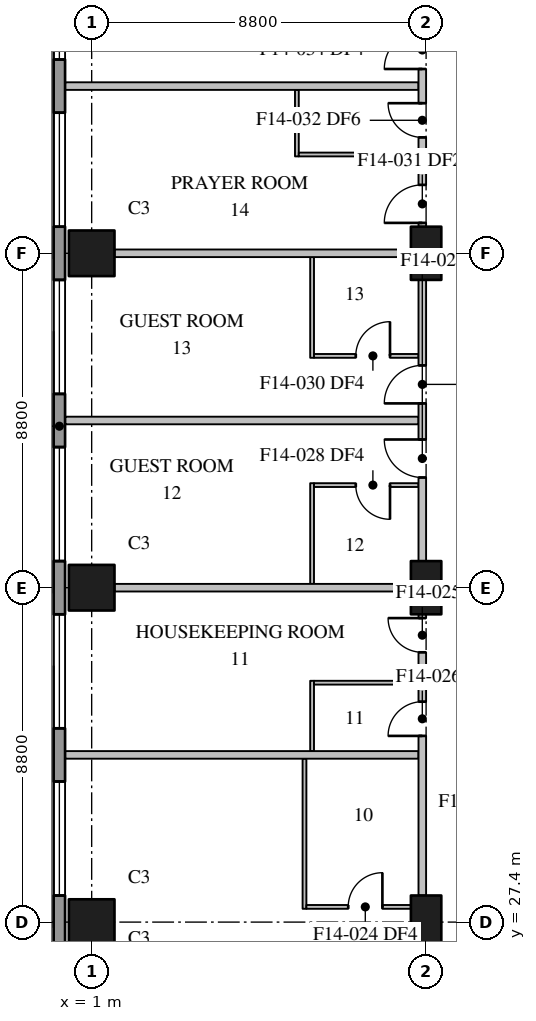
"""IFC4 building model, lengths in metres.
Left out: names, types, materials, properties, quantities, classifications, styles, units other than length and angle.
Written with IfcOpenShell. Run it as: python <this file> out.ifc"""

import sys

from ifc_helpers import new_model, si_unit, direction, frame, frame_2d, origin, origin_2d, place, context, subcontext, project, spatial, rectangle, extrude, element, fill, save


model = new_model("IFC4")
c1 = context("Model", 3, precision=1e-05, world=origin(), true_north=direction((0.0, 1.0)))
c2 = subcontext(c1, "Body", "Model", "MODEL_VIEW")
j1 = project(units=[si_unit("LENGTHUNIT", "METRE"), si_unit("PLANEANGLEUNIT", "RADIAN")], contexts=[c1])
p1 = place(None, origin())
s1 = spatial("IfcSite", under=j1, at=p1, CompositionType="ELEMENT")
p2 = place(p1, origin())
s2 = spatial("IfcBuilding", under=s1, at=p2, CompositionType="ELEMENT")
p3 = place(p2, frame((0.0, 0.0, 129.6)))
s3 = spatial("IfcBuildingStorey", under=s2, at=p3, CompositionType="ELEMENT", Elevation=129.6)
for number, where, z_axis, x_axis in (
    (1, (1.0, 27.4, 0.0), (0.0, 0.0, 1.0), (1.0, 0.0, 0.0)),
    (2, (1.0, 36.2, 0.0), (0.0, 0.0, 1.0), (1.0, 0.0, 0.0)),
    (3, (1.0, 45.0, 0.0), (0.0, 0.0, 1.0), (1.0, 0.0, 0.0)),
):
    element("IfcColumn", number, at=place(p3, frame(where, z_axis=z_axis, x_axis=x_axis)), inside=s3, PredefinedType="COLUMN", context=c2, shape_type="SweptSolid", body=[
        extrude(rectangle(XDim=1.2, YDim=1.2, at=origin_2d()), origin(), (0.0, 0.0, 1.0), 3.7),
    ])
for number, where, z_axis, x_axis in (
    (4, (9.8, 27.4, 0.0), (0.0, 0.0, 1.0), (0.0, 1.0, 0.0)),
    (5, (9.8, 36.2, 0.0), (0.0, 0.0, 1.0), (0.0, 1.0, 0.0)),
    (6, (9.8, 45.0, 0.0), (0.0, 0.0, 1.0), (0.0, 1.0, 0.0)),
):
    element("IfcColumn", number, at=place(p3, frame(where, z_axis=z_axis, x_axis=x_axis)), inside=s3, PredefinedType="COLUMN", context=c2, shape_type="SweptSolid", body=[
        extrude(rectangle(XDim=1.4, YDim=0.8, at=origin_2d()), origin(), (0.0, 0.0, 1.0), 3.7),
    ])
p4 = place(p3, frame((0.15, 78.7, 0.0), z_axis=(0.0, 0.0, 1.0), x_axis=(0.0, -1.0, 0.0)))
e7 = element("IfcWall", 7, at=p4, inside=s3, PredefinedType="STANDARD", context=c2, shape_type="SweptSolid", body=[
    extrude(rectangle(XDim=76.5, YDim=0.3, at=frame_2d((38.25, 0.0))), origin(), (0.0, 0.0, 1.0), 3.25),
])
p5 = place(p4, frame((3.6, 0.0, 0.75)))
e8 = element("IfcOpeningElement", 8, at=p5, cuts=e7, PredefinedType="OPENING", context=c2, shape_type="SweptSolid", body=[
    extrude(rectangle(XDim=3.0, YDim=2.3, at=frame_2d((1.5, 1.15))), frame((0.0, 0.16, 0.0), z_axis=(0.0, -1.0, 0.0), x_axis=(1.0, 0.0, 0.0)), (0.0, 0.0, 1.0), 0.32),
])
p6 = place(p4, frame((8.0, 0.0, 0.75)))
e9 = element("IfcOpeningElement", 9, at=p6, cuts=e7, PredefinedType="OPENING", context=c2, shape_type="SweptSolid", body=[
    extrude(rectangle(XDim=3.0, YDim=2.3, at=frame_2d((1.5, 1.15))), frame((0.0, 0.16, 0.0), z_axis=(0.0, -1.0, 0.0), x_axis=(1.0, 0.0, 0.0)), (0.0, 0.0, 1.0), 0.32),
])
p7 = place(p4, frame((12.4, 0.0, 0.75)))
e10 = element("IfcOpeningElement", 10, at=p7, cuts=e7, PredefinedType="OPENING", context=c2, shape_type="SweptSolid", body=[
    extrude(rectangle(XDim=3.0, YDim=2.3, at=frame_2d((1.5, 1.15))), frame((0.0, 0.16, 0.0), z_axis=(0.0, -1.0, 0.0), x_axis=(1.0, 0.0, 0.0)), (0.0, 0.0, 1.0), 0.32),
])
p8 = place(p4, frame((16.8, 0.0, 0.75)))
e11 = element("IfcOpeningElement", 11, at=p8, cuts=e7, PredefinedType="OPENING", context=c2, shape_type="SweptSolid", body=[
    extrude(rectangle(XDim=3.0, YDim=2.3, at=frame_2d((1.5, 1.15))), frame((0.0, 0.16, 0.0), z_axis=(0.0, -1.0, 0.0), x_axis=(1.0, 0.0, 0.0)), (0.0, 0.0, 1.0), 0.32),
])
p9 = place(p4, frame((21.2, 0.0, 0.75)))
e12 = element("IfcOpeningElement", 12, at=p9, cuts=e7, PredefinedType="OPENING", context=c2, shape_type="SweptSolid", body=[
    extrude(rectangle(XDim=3.0, YDim=2.3, at=frame_2d((1.5, 1.15))), frame((0.0, 0.16, 0.0), z_axis=(0.0, -1.0, 0.0), x_axis=(1.0, 0.0, 0.0)), (0.0, 0.0, 1.0), 0.32),
])
p10 = place(p4, frame((25.6, 0.0, 0.75)))
e13 = element("IfcOpeningElement", 13, at=p10, cuts=e7, PredefinedType="OPENING", context=c2, shape_type="SweptSolid", body=[
    extrude(rectangle(XDim=3.0, YDim=2.3, at=frame_2d((1.5, 1.15))), frame((0.0, 0.16, 0.0), z_axis=(0.0, -1.0, 0.0), x_axis=(1.0, 0.0, 0.0)), (0.0, 0.0, 1.0), 0.32),
])
p11 = place(p4, frame((30.0, 0.0, 0.75)))
e14 = element("IfcOpeningElement", 14, at=p11, cuts=e7, PredefinedType="OPENING", context=c2, shape_type="SweptSolid", body=[
    extrude(rectangle(XDim=3.0, YDim=2.3, at=frame_2d((1.5, 1.15))), frame((0.0, 0.16, 0.0), z_axis=(0.0, -1.0, 0.0), x_axis=(1.0, 0.0, 0.0)), (0.0, 0.0, 1.0), 0.32),
])
p12 = place(p4, frame((34.4, 0.0, 0.75)))
e15 = element("IfcOpeningElement", 15, at=p12, cuts=e7, PredefinedType="OPENING", context=c2, shape_type="SweptSolid", body=[
    extrude(rectangle(XDim=3.0, YDim=2.3, at=frame_2d((1.5, 1.15))), frame((0.0, 0.16, 0.0), z_axis=(0.0, -1.0, 0.0), x_axis=(1.0, 0.0, 0.0)), (0.0, 0.0, 1.0), 0.32),
])
p13 = place(p4, frame((38.8, 0.0, 0.75)))
e16 = element("IfcOpeningElement", 16, at=p13, cuts=e7, PredefinedType="OPENING", context=c2, shape_type="SweptSolid", body=[
    extrude(rectangle(XDim=3.0, YDim=2.3, at=frame_2d((1.5, 1.15))), frame((0.0, 0.16, 0.0), z_axis=(0.0, -1.0, 0.0), x_axis=(1.0, 0.0, 0.0)), (0.0, 0.0, 1.0), 0.32),
])
p14 = place(p4, frame((43.2, 0.0, 0.75)))
e17 = element("IfcOpeningElement", 17, at=p14, cuts=e7, PredefinedType="OPENING", context=c2, shape_type="SweptSolid", body=[
    extrude(rectangle(XDim=3.0, YDim=2.3, at=frame_2d((1.5, 1.15))), frame((0.0, 0.16, 0.0), z_axis=(0.0, -1.0, 0.0), x_axis=(1.0, 0.0, 0.0)), (0.0, 0.0, 1.0), 0.32),
])
p15 = place(p4, frame((47.6, 0.0, 0.75)))
e18 = element("IfcOpeningElement", 18, at=p15, cuts=e7, PredefinedType="OPENING", context=c2, shape_type="SweptSolid", body=[
    extrude(rectangle(XDim=3.0, YDim=2.3, at=frame_2d((1.5, 1.15))), frame((0.0, 0.16, 0.0), z_axis=(0.0, -1.0, 0.0), x_axis=(1.0, 0.0, 0.0)), (0.0, 0.0, 1.0), 0.32),
])
p16 = place(p4, frame((52.0, 0.0, 0.75)))
e19 = element("IfcOpeningElement", 19, at=p16, cuts=e7, PredefinedType="OPENING", context=c2, shape_type="SweptSolid", body=[
    extrude(rectangle(XDim=3.0, YDim=2.3, at=frame_2d((1.5, 1.15))), frame((0.0, 0.16, 0.0), z_axis=(0.0, -1.0, 0.0), x_axis=(1.0, 0.0, 0.0)), (0.0, 0.0, 1.0), 0.32),
])
p17 = place(p4, frame((56.4, 0.0, 0.75)))
e20 = element("IfcOpeningElement", 20, at=p17, cuts=e7, PredefinedType="OPENING", context=c2, shape_type="SweptSolid", body=[
    extrude(rectangle(XDim=3.0, YDim=2.3, at=frame_2d((1.5, 1.15))), frame((0.0, 0.16, 0.0), z_axis=(0.0, -1.0, 0.0), x_axis=(1.0, 0.0, 0.0)), (0.0, 0.0, 1.0), 0.32),
])
p18 = place(p4, frame((60.8, 0.0, 0.75)))
e21 = element("IfcOpeningElement", 21, at=p18, cuts=e7, PredefinedType="OPENING", context=c2, shape_type="SweptSolid", body=[
    extrude(rectangle(XDim=3.0, YDim=2.3, at=frame_2d((1.5, 1.15))), frame((0.0, 0.16, 0.0), z_axis=(0.0, -1.0, 0.0), x_axis=(1.0, 0.0, 0.0)), (0.0, 0.0, 1.0), 0.32),
])
p19 = place(p4, frame((65.2, 0.0, 0.75)))
e22 = element("IfcOpeningElement", 22, at=p19, cuts=e7, PredefinedType="OPENING", context=c2, shape_type="SweptSolid", body=[
    extrude(rectangle(XDim=3.0, YDim=2.3, at=frame_2d((1.5, 1.15))), frame((0.0, 0.16, 0.0), z_axis=(0.0, -1.0, 0.0), x_axis=(1.0, 0.0, 0.0)), (0.0, 0.0, 1.0), 0.32),
])
p20 = place(p4, frame((69.6, 0.0, 0.75)))
e23 = element("IfcOpeningElement", 23, at=p20, cuts=e7, PredefinedType="OPENING", context=c2, shape_type="SweptSolid", body=[
    extrude(rectangle(XDim=3.0, YDim=2.3, at=frame_2d((1.5, 1.15))), frame((0.0, 0.16, 0.0), z_axis=(0.0, -1.0, 0.0), x_axis=(1.0, 0.0, 0.0)), (0.0, 0.0, 1.0), 0.32),
])
p21 = place(p3, frame((9.7, 28.1, 0.0), z_axis=(0.0, 0.0, 1.0), x_axis=(0.0, 1.0, 0.0)))
e24 = element("IfcWall", 24, at=p21, inside=s3, PredefinedType="PARTITIONING", context=c2, shape_type="SweptSolid", body=[
    extrude(rectangle(XDim=7.4, YDim=0.2, at=frame_2d((3.7, 0.0))), origin(), (0.0, 0.0, 1.0), 3.25),
])
p22 = place(p21, frame((6.4, 0.0, 0.0)))
e25 = element("IfcOpeningElement", 25, at=p22, cuts=e24, PredefinedType="OPENING", context=c2, shape_type="SweptSolid", body=[
    extrude(rectangle(XDim=0.9, YDim=2.1, at=frame_2d((0.45, 1.05))), frame((0.0, 0.11, 0.0), z_axis=(0.0, -1.0, 0.0), x_axis=(1.0, 0.0, 0.0)), (0.0, 0.0, 1.0), 0.22),
])
p23 = place(p21, frame((4.2, 0.0, 0.0)))
e26 = element("IfcOpeningElement", 26, at=p23, cuts=e24, PredefinedType="OPENING", context=c2, shape_type="SweptSolid", body=[
    extrude(rectangle(XDim=0.9, YDim=2.1, at=frame_2d((0.45, 1.05))), frame((0.0, 0.11, 0.0), z_axis=(0.0, -1.0, 0.0), x_axis=(1.0, 0.0, 0.0)), (0.0, 0.0, 1.0), 0.22),
])
p24 = place(p3, frame((9.7, 36.9, 0.0), z_axis=(0.0, 0.0, 1.0), x_axis=(0.0, 1.0, 0.0)))
e27 = element("IfcWall", 27, at=p24, inside=s3, PredefinedType="PARTITIONING", context=c2, shape_type="SweptSolid", body=[
    extrude(rectangle(XDim=7.4, YDim=0.2, at=frame_2d((3.7, 0.0))), origin(), (0.0, 0.0, 1.0), 3.25),
])
p25 = place(p24, frame((2.2, 0.0, 0.0)))
e28 = element("IfcOpeningElement", 28, at=p25, cuts=e27, PredefinedType="OPENING", context=c2, shape_type="SweptSolid", body=[
    extrude(rectangle(XDim=1.0, YDim=2.1, at=frame_2d((0.5, 1.05))), frame((0.0, 0.11, 0.0), z_axis=(0.0, -1.0, 0.0), x_axis=(1.0, 0.0, 0.0)), (0.0, 0.0, 1.0), 0.22),
])
p26 = place(p24, frame((4.15, 0.0, 0.0)))
e29 = element("IfcOpeningElement", 29, at=p26, cuts=e27, PredefinedType="OPENING", context=c2, shape_type="SweptSolid", body=[
    extrude(rectangle(XDim=1.0, YDim=2.1, at=frame_2d((0.5, 1.05))), frame((0.0, 0.11, 0.0), z_axis=(0.0, -1.0, 0.0), x_axis=(1.0, 0.0, 0.0)), (0.0, 0.0, 1.0), 0.22),
])
p27 = place(p3, frame((9.7, 45.7, 0.0), z_axis=(0.0, 0.0, 1.0), x_axis=(0.0, 1.0, 0.0)))
e30 = element("IfcWall", 30, at=p27, inside=s3, PredefinedType="PARTITIONING", context=c2, shape_type="SweptSolid", body=[
    extrude(rectangle(XDim=7.4, YDim=0.2, at=frame_2d((3.7, 0.0))), origin(), (0.0, 0.0, 1.0), 3.25),
])
p28 = place(p27, frame((0.1, 0.0, 0.0)))
e31 = element("IfcOpeningElement", 31, at=p28, cuts=e30, PredefinedType="OPENING", context=c2, shape_type="SweptSolid", body=[
    extrude(rectangle(XDim=1.0, YDim=2.1, at=frame_2d((0.5, 1.05))), frame((0.0, 0.11, 0.0), z_axis=(0.0, -1.0, 0.0), x_axis=(1.0, 0.0, 0.0)), (0.0, 0.0, 1.0), 0.22),
])
p29 = place(p27, frame((2.35, 0.0, 0.0)))
e32 = element("IfcOpeningElement", 32, at=p29, cuts=e30, PredefinedType="OPENING", context=c2, shape_type="SweptSolid", body=[
    extrude(rectangle(XDim=0.9, YDim=2.1, at=frame_2d((0.45, 1.05))), frame((0.0, 0.11, 0.0), z_axis=(0.0, -1.0, 0.0), x_axis=(1.0, 0.0, 0.0)), (0.0, 0.0, 1.0), 0.22),
])
p30 = place(p27, frame((4.15, 0.0, 0.0)))
e33 = element("IfcOpeningElement", 33, at=p30, cuts=e30, PredefinedType="OPENING", context=c2, shape_type="SweptSolid", body=[
    extrude(rectangle(XDim=1.0, YDim=2.1, at=frame_2d((0.5, 1.05))), frame((0.0, 0.11, 0.0), z_axis=(0.0, -1.0, 0.0), x_axis=(1.0, 0.0, 0.0)), (0.0, 0.0, 1.0), 0.22),
])
p31 = place(p3, frame((0.31, 31.8, 0.0), z_axis=(0.0, 0.0, 1.0), x_axis=(1.0, 0.0, 0.0)))
e34 = element("IfcWall", 34, at=p31, inside=s3, PredefinedType="PARTITIONING", context=c2, shape_type="SweptSolid", body=[
    extrude(rectangle(XDim=9.29, YDim=0.2, at=frame_2d((4.645, 0.0))), origin(), (0.0, 0.0, 1.0), 3.25),
])
p32 = place(p3, frame((1.6, 36.2, 0.0), z_axis=(0.0, 0.0, 1.0), x_axis=(1.0, 0.0, 0.0)))
e35 = element("IfcWall", 35, at=p32, inside=s3, PredefinedType="PARTITIONING", context=c2, shape_type="SweptSolid", body=[
    extrude(rectangle(XDim=7.8, YDim=0.2, at=frame_2d((3.9, 0.0))), origin(), (0.0, 0.0, 1.0), 3.25),
])
p33 = place(p3, frame((0.31, 40.6, 0.0), z_axis=(0.0, 0.0, 1.0), x_axis=(1.0, 0.0, 0.0)))
e36 = element("IfcWall", 36, at=p33, inside=s3, PredefinedType="PARTITIONING", context=c2, shape_type="SweptSolid", body=[
    extrude(rectangle(XDim=9.29, YDim=0.2, at=frame_2d((4.645, 0.0))), origin(), (0.0, 0.0, 1.0), 3.25),
])
p34 = place(p3, frame((1.6, 45.0, 0.0), z_axis=(0.0, 0.0, 1.0), x_axis=(1.0, 0.0, 0.0)))
e37 = element("IfcWall", 37, at=p34, inside=s3, PredefinedType="PARTITIONING", context=c2, shape_type="SweptSolid", body=[
    extrude(rectangle(XDim=7.8, YDim=0.2, at=frame_2d((3.9, 0.0))), origin(), (0.0, 0.0, 1.0), 3.25),
])
p35 = place(p3, frame((0.31, 49.4, 0.0), z_axis=(0.0, 0.0, 1.0), x_axis=(1.0, 0.0, 0.0)))
e38 = element("IfcWall", 38, at=p35, inside=s3, PredefinedType="PARTITIONING", context=c2, shape_type="SweptSolid", body=[
    extrude(rectangle(XDim=9.29, YDim=0.2, at=frame_2d((4.645, 0.0))), origin(), (0.0, 0.0, 1.0), 3.25),
])
p36 = place(p3, frame((6.8, 31.9, 0.0), z_axis=(0.0, 0.0, 1.0), x_axis=(0.0, 1.0, 0.0)))
e39 = element("IfcWall", 39, at=p36, inside=s3, PredefinedType="PARTITIONING", context=c2, shape_type="SweptSolid", body=[
    extrude(rectangle(XDim=1.85, YDim=0.1, at=frame_2d((0.925, 0.0))), origin(), (0.0, 0.0, 1.0), 3.25),
])
for number, where, z_axis, x_axis in (
    (40, (6.8, 36.3, 0.0), (0.0, 0.0, 1.0), (0.0, 1.0, 0.0)),
    (41, (6.8, 42.25, 0.0), (0.0, 0.0, 1.0), (0.0, 1.0, 0.0)),
):
    element("IfcWall", number, at=place(p3, frame(where, z_axis=z_axis, x_axis=x_axis)), inside=s3, PredefinedType="PARTITIONING", context=c2, shape_type="SweptSolid", body=[
        extrude(rectangle(XDim=2.65, YDim=0.1, at=frame_2d((1.325, 0.0))), origin(), (0.0, 0.0, 1.0), 3.25),
    ])
p37 = place(p3, frame((6.6, 27.75, 0.0), z_axis=(0.0, 0.0, 1.0), x_axis=(0.0, 1.0, 0.0)))
e42 = element("IfcWall", 42, at=p37, inside=s3, PredefinedType="PARTITIONING", context=c2, shape_type="SweptSolid", body=[
    extrude(rectangle(XDim=3.95, YDim=0.1, at=frame_2d((1.975, 0.0))), origin(), (0.0, 0.0, 1.0), 3.25),
])
p38 = place(p3, frame((6.65, 27.8, 0.0), z_axis=(0.0, 0.0, 1.0), x_axis=(1.0, 0.0, 0.0)))
e43 = element("IfcWall", 43, at=p38, inside=s3, PredefinedType="PARTITIONING", context=c2, shape_type="SweptSolid", body=[
    extrude(rectangle(XDim=2.75, YDim=0.1, at=frame_2d((1.375, 0.0))), origin(), (0.0, 0.0, 1.0), 3.25),
])
p39 = place(p38, frame((1.1, 0.0, 0.0)))
e44 = element("IfcOpeningElement", 44, at=p39, cuts=e43, PredefinedType="OPENING", context=c2, shape_type="SweptSolid", body=[
    extrude(rectangle(XDim=0.9, YDim=2.1, at=frame_2d((0.45, 1.05))), frame((0.0, 0.06, 0.0), z_axis=(0.0, -1.0, 0.0), x_axis=(1.0, 0.0, 0.0)), (0.0, 0.0, 1.0), 0.12),
])
p40 = place(p3, frame((6.85, 33.7, 0.0), z_axis=(0.0, 0.0, 1.0), x_axis=(1.0, 0.0, 0.0)))
e45 = element("IfcWall", 45, at=p40, inside=s3, PredefinedType="PARTITIONING", context=c2, shape_type="SweptSolid", body=[
    extrude(rectangle(XDim=2.75, YDim=0.1, at=frame_2d((1.375, 0.0))), origin(), (0.0, 0.0, 1.0), 3.25),
])
p41 = place(p3, frame((9.6, 38.9, 0.0), z_axis=(0.0, 0.0, 1.0), x_axis=(-1.0, 0.0, 0.0)))
e46 = element("IfcWall", 46, at=p41, inside=s3, PredefinedType="PARTITIONING", context=c2, shape_type="SweptSolid", body=[
    extrude(rectangle(XDim=2.75, YDim=0.1, at=frame_2d((1.375, 0.0))), origin(), (0.0, 0.0, 1.0), 3.25),
])
p42 = place(p41, frame((0.75, 0.0, 0.0)))
e47 = element("IfcOpeningElement", 47, at=p42, cuts=e46, PredefinedType="OPENING", context=c2, shape_type="SweptSolid", body=[
    extrude(rectangle(XDim=0.9, YDim=2.1, at=frame_2d((0.45, 1.05))), frame((0.0, 0.06, 0.0), z_axis=(0.0, -1.0, 0.0), x_axis=(1.0, 0.0, 0.0)), (0.0, 0.0, 1.0), 0.12),
])
p43 = place(p3, frame((6.85, 42.3, 0.0), z_axis=(0.0, 0.0, 1.0), x_axis=(1.0, 0.0, 0.0)))
e48 = element("IfcWall", 48, at=p43, inside=s3, PredefinedType="PARTITIONING", context=c2, shape_type="SweptSolid", body=[
    extrude(rectangle(XDim=2.75, YDim=0.1, at=frame_2d((1.375, 0.0))), origin(), (0.0, 0.0, 1.0), 3.25),
])
p44 = place(p43, frame((1.1, 0.0, 0.0)))
e49 = element("IfcOpeningElement", 49, at=p44, cuts=e48, PredefinedType="OPENING", context=c2, shape_type="SweptSolid", body=[
    extrude(rectangle(XDim=0.9, YDim=2.1, at=frame_2d((0.45, 1.05))), frame((0.0, 0.06, 0.0), z_axis=(0.0, -1.0, 0.0), x_axis=(1.0, 0.0, 0.0)), (0.0, 0.0, 1.0), 0.12),
])
p45 = place(p3, frame((6.4, 47.55, 0.0), z_axis=(0.0, 0.0, 1.0), x_axis=(0.0, 1.0, 0.0)))
e50 = element("IfcWall", 50, at=p45, inside=s3, PredefinedType="PARTITIONING", context=c2, shape_type="SweptSolid", body=[
    extrude(rectangle(XDim=1.75, YDim=0.1, at=frame_2d((0.875, 0.0))), origin(), (0.0, 0.0, 1.0), 3.25),
])
p46 = place(p3, frame((6.45, 47.6, 0.0), z_axis=(0.0, 0.0, 1.0), x_axis=(1.0, 0.0, 0.0)))
e51 = element("IfcWall", 51, at=p46, inside=s3, PredefinedType="PARTITIONING", context=c2, shape_type="SweptSolid", body=[
    extrude(rectangle(XDim=3.15, YDim=0.1, at=frame_2d((1.575, 0.0))), origin(), (0.0, 0.0, 1.0), 3.25),
])
p47 = place(p10, origin())
e52 = element("IfcWindow", 52, at=p47, inside=s3, PartitioningType="SINGLE_PANEL", PredefinedType="WINDOW", context=c2, shape_type="SweptSolid", body=[
    extrude(rectangle(XDim=3.0, YDim=2.3, at=frame_2d((1.5, 1.15))), frame((0.0, 0.03, 0.0), z_axis=(0.0, -1.0, 0.0), x_axis=(1.0, 0.0, 0.0)), (0.0, 0.0, 1.0), 0.06),
])
fill(e13, e52)
p48 = place(p11, origin())
e53 = element("IfcWindow", 53, at=p48, inside=s3, PartitioningType="SINGLE_PANEL", PredefinedType="WINDOW", context=c2, shape_type="SweptSolid", body=[
    extrude(rectangle(XDim=3.0, YDim=2.3, at=frame_2d((1.5, 1.15))), frame((0.0, 0.03, 0.0), z_axis=(0.0, -1.0, 0.0), x_axis=(1.0, 0.0, 0.0)), (0.0, 0.0, 1.0), 0.06),
])
fill(e14, e53)
p49 = place(p12, origin())
e54 = element("IfcWindow", 54, at=p49, inside=s3, PartitioningType="SINGLE_PANEL", PredefinedType="WINDOW", context=c2, shape_type="SweptSolid", body=[
    extrude(rectangle(XDim=3.0, YDim=2.3, at=frame_2d((1.5, 1.15))), frame((0.0, 0.03, 0.0), z_axis=(0.0, -1.0, 0.0), x_axis=(1.0, 0.0, 0.0)), (0.0, 0.0, 1.0), 0.06),
])
fill(e15, e54)
p50 = place(p13, origin())
e55 = element("IfcWindow", 55, at=p50, inside=s3, PartitioningType="SINGLE_PANEL", PredefinedType="WINDOW", context=c2, shape_type="SweptSolid", body=[
    extrude(rectangle(XDim=3.0, YDim=2.3, at=frame_2d((1.5, 1.15))), frame((0.0, 0.03, 0.0), z_axis=(0.0, -1.0, 0.0), x_axis=(1.0, 0.0, 0.0)), (0.0, 0.0, 1.0), 0.06),
])
fill(e16, e55)
p51 = place(p14, origin())
e56 = element("IfcWindow", 56, at=p51, inside=s3, PartitioningType="SINGLE_PANEL", PredefinedType="WINDOW", context=c2, shape_type="SweptSolid", body=[
    extrude(rectangle(XDim=3.0, YDim=2.3, at=frame_2d((1.5, 1.15))), frame((0.0, 0.03, 0.0), z_axis=(0.0, -1.0, 0.0), x_axis=(1.0, 0.0, 0.0)), (0.0, 0.0, 1.0), 0.06),
])
fill(e17, e56)
p52 = place(p15, origin())
e57 = element("IfcWindow", 57, at=p52, inside=s3, PartitioningType="SINGLE_PANEL", PredefinedType="WINDOW", context=c2, shape_type="SweptSolid", body=[
    extrude(rectangle(XDim=3.0, YDim=2.3, at=frame_2d((1.5, 1.15))), frame((0.0, 0.03, 0.0), z_axis=(0.0, -1.0, 0.0), x_axis=(1.0, 0.0, 0.0)), (0.0, 0.0, 1.0), 0.06),
])
fill(e18, e57)
p53 = place(p39, origin())
e58 = element("IfcDoor", 58, at=p53, inside=s3, OperationType="SINGLE_SWING_RIGHT", PredefinedType="DOOR", context=c2, shape_type="SweptSolid", body=[
    extrude(rectangle(XDim=0.9, YDim=2.1, at=frame_2d((0.45, 1.05))), frame((0.0, 0.025, 0.0), z_axis=(0.0, -1.0, 0.0), x_axis=(1.0, 0.0, 0.0)), (0.0, 0.0, 1.0), 0.05),
])
fill(e44, e58)
p54 = place(p22, origin())
e59 = element("IfcDoor", 59, at=p54, inside=s3, OperationType="SINGLE_SWING_RIGHT", PredefinedType="DOOR", context=c2, shape_type="SweptSolid", body=[
    extrude(rectangle(XDim=0.9, YDim=2.1, at=frame_2d((0.45, 1.05))), frame((0.0, 0.025, 0.0), z_axis=(0.0, -1.0, 0.0), x_axis=(1.0, 0.0, 0.0)), (0.0, 0.0, 1.0), 0.05),
])
fill(e25, e59)
p55 = place(p23, origin())
e60 = element("IfcDoor", 60, at=p55, inside=s3, OperationType="SINGLE_SWING_LEFT", PredefinedType="DOOR", context=c2, shape_type="SweptSolid", body=[
    extrude(rectangle(XDim=0.9, YDim=2.1, at=frame_2d((0.45, 1.05))), frame((0.0, 0.025, 0.0), z_axis=(0.0, -1.0, 0.0), x_axis=(1.0, 0.0, 0.0)), (0.0, 0.0, 1.0), 0.05),
])
fill(e26, e60)
p56 = place(p25, origin())
e61 = element("IfcDoor", 61, at=p56, inside=s3, OperationType="SINGLE_SWING_RIGHT", PredefinedType="DOOR", context=c2, shape_type="SweptSolid", body=[
    extrude(rectangle(XDim=1.0, YDim=2.1, at=frame_2d((0.5, 1.05))), frame((0.0, 0.025, 0.0), z_axis=(0.0, -1.0, 0.0), x_axis=(1.0, 0.0, 0.0)), (0.0, 0.0, 1.0), 0.05),
])
fill(e28, e61)
p57 = place(p42, origin())
e62 = element("IfcDoor", 62, at=p57, inside=s3, OperationType="SINGLE_SWING_LEFT", PredefinedType="DOOR", context=c2, shape_type="SweptSolid", body=[
    extrude(rectangle(XDim=0.9, YDim=2.1, at=frame_2d((0.45, 1.05))), frame((0.0, 0.025, 0.0), z_axis=(0.0, -1.0, 0.0), x_axis=(1.0, 0.0, 0.0)), (0.0, 0.0, 1.0), 0.05),
])
fill(e47, e62)
p58 = place(p26, origin())
e63 = element("IfcDoor", 63, at=p58, inside=s3, OperationType="SINGLE_SWING_LEFT", PredefinedType="DOOR", context=c2, shape_type="SweptSolid", body=[
    extrude(rectangle(XDim=1.0, YDim=2.1, at=frame_2d((0.5, 1.05))), frame((0.0, 0.025, 0.0), z_axis=(0.0, -1.0, 0.0), x_axis=(1.0, 0.0, 0.0)), (0.0, 0.0, 1.0), 0.05),
])
fill(e29, e63)
p59 = place(p44, origin())
e64 = element("IfcDoor", 64, at=p59, inside=s3, OperationType="SINGLE_SWING_RIGHT", PredefinedType="DOOR", context=c2, shape_type="SweptSolid", body=[
    extrude(rectangle(XDim=0.9, YDim=2.1, at=frame_2d((0.45, 1.05))), frame((0.0, 0.025, 0.0), z_axis=(0.0, -1.0, 0.0), x_axis=(1.0, 0.0, 0.0)), (0.0, 0.0, 1.0), 0.05),
])
fill(e49, e64)
p60 = place(p28, origin())
e65 = element("IfcDoor", 65, at=p60, inside=s3, OperationType="SINGLE_SWING_LEFT", PredefinedType="DOOR", context=c2, shape_type="SweptSolid", body=[
    extrude(rectangle(XDim=1.0, YDim=2.1, at=frame_2d((0.5, 1.05))), frame((0.0, 0.025, 0.0), z_axis=(0.0, -1.0, 0.0), x_axis=(1.0, 0.0, 0.0)), (0.0, 0.0, 1.0), 0.05),
])
fill(e31, e65)
p61 = place(p29, origin())
e66 = element("IfcDoor", 66, at=p61, inside=s3, OperationType="SINGLE_SWING_RIGHT", PredefinedType="DOOR", context=c2, shape_type="SweptSolid", body=[
    extrude(rectangle(XDim=0.9, YDim=2.1, at=frame_2d((0.45, 1.05))), frame((0.0, 0.025, 0.0), z_axis=(0.0, -1.0, 0.0), x_axis=(1.0, 0.0, 0.0)), (0.0, 0.0, 1.0), 0.05),
])
fill(e32, e66)
p62 = place(p30, origin())
e67 = element("IfcDoor", 67, at=p62, inside=s3, OperationType="SINGLE_SWING_LEFT", PredefinedType="DOOR", context=c2, shape_type="SweptSolid", body=[
    extrude(rectangle(XDim=1.0, YDim=2.1, at=frame_2d((0.5, 1.05))), frame((0.0, 0.025, 0.0), z_axis=(0.0, -1.0, 0.0), x_axis=(1.0, 0.0, 0.0)), (0.0, 0.0, 1.0), 0.05),
])
fill(e33, e67)
save(model, sys.argv[1])
